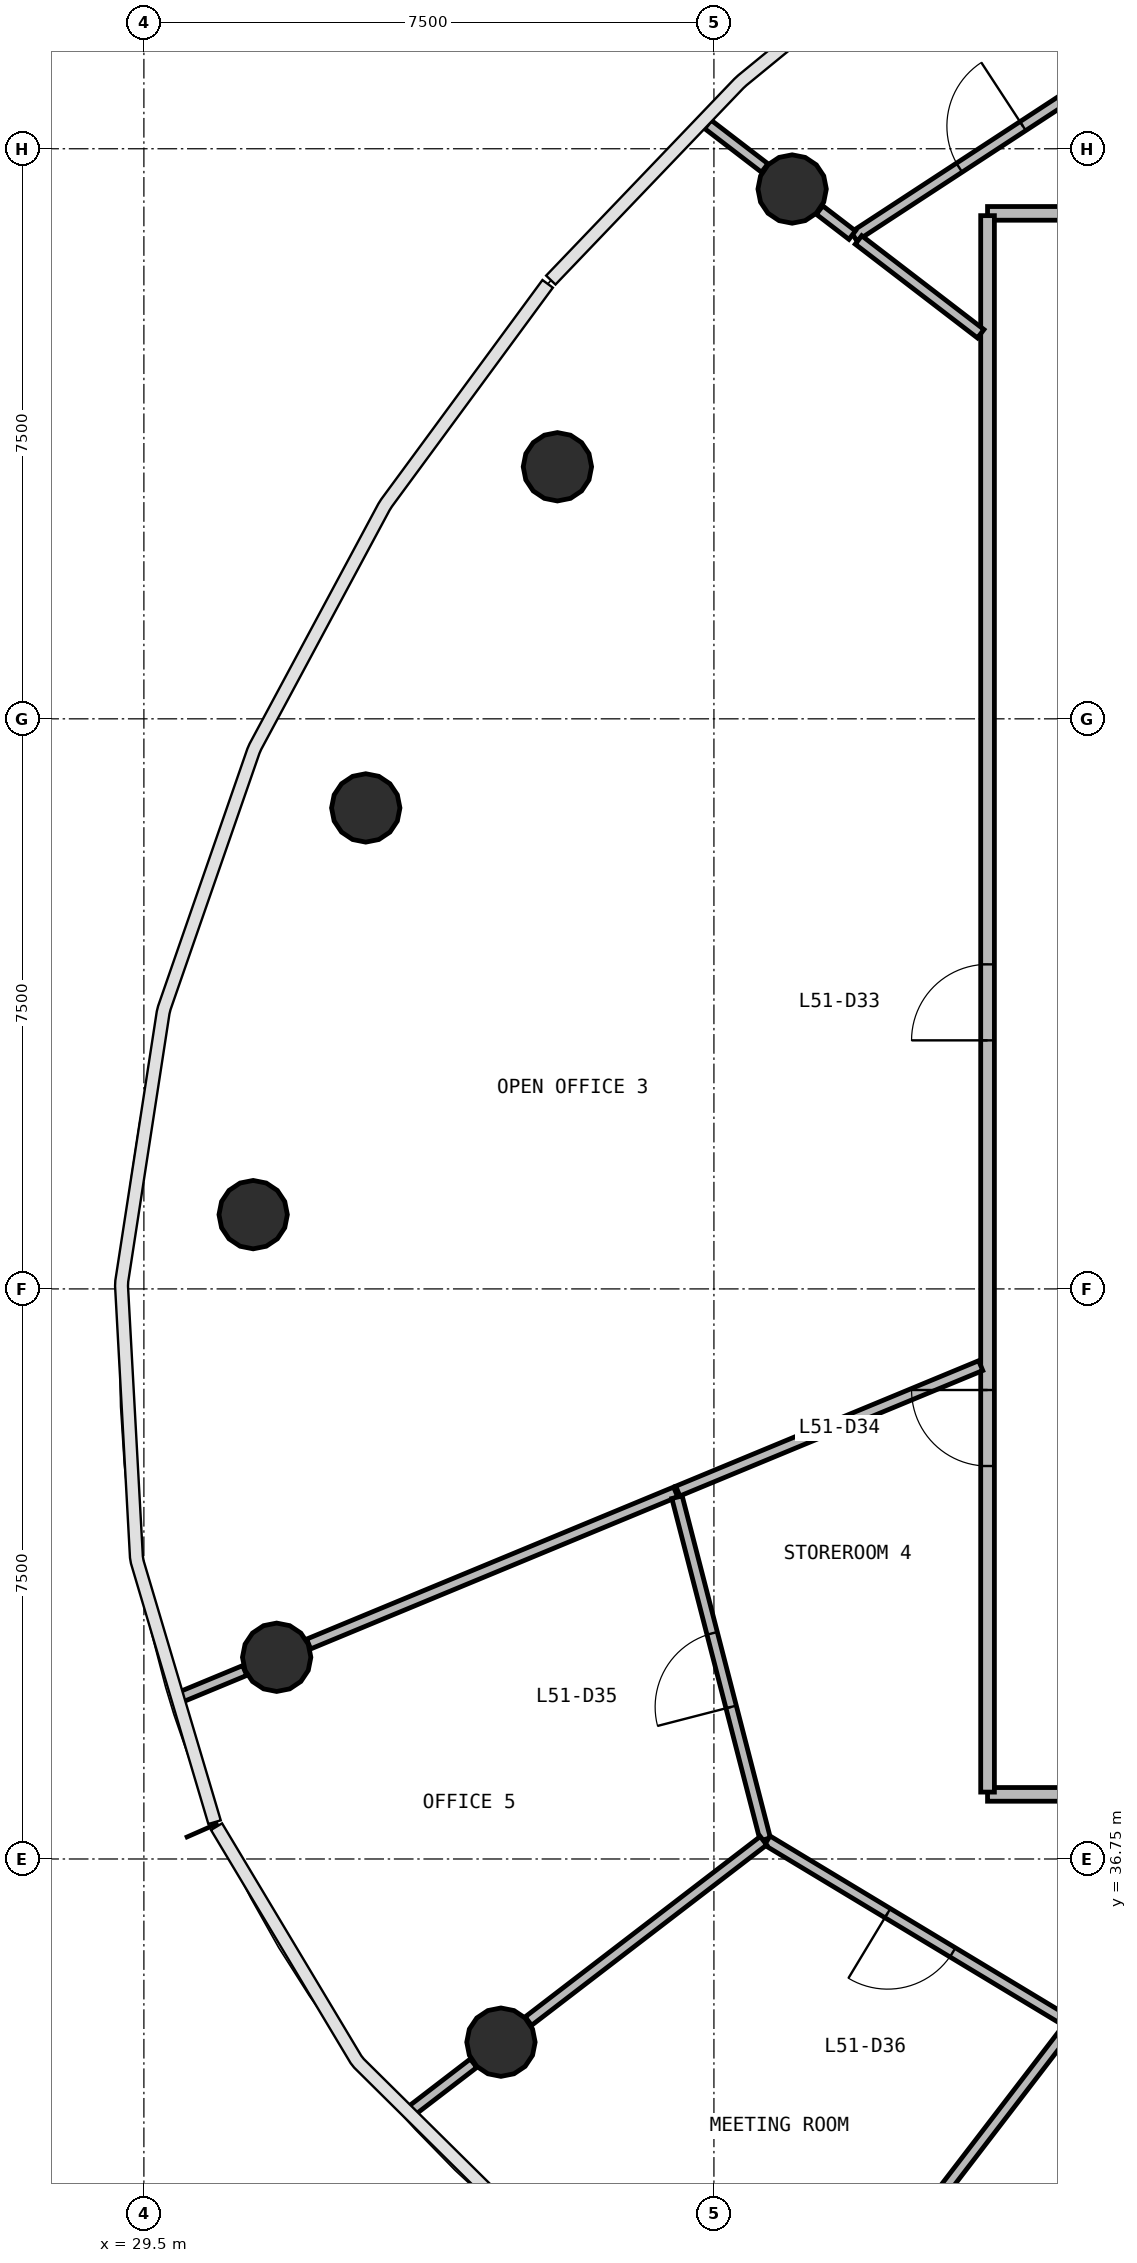
"""IFC4 building model, lengths in metres.
Left out: names, types, materials, properties, quantities, classifications, styles, units other than length and angle.
Written with IfcOpenShell. Run it as: python <this file> out.ifc"""

import sys

from ifc_helpers import new_model, si_unit, direction, frame, frame_2d, origin, origin_2d, place, context, subcontext, project, spatial, rectangle, circle, extrude, source, transform, mapped, element, fill, save


model = new_model("IFC4")
c1 = context("Model", 3, precision=1e-05, world=origin(), true_north=direction((0.0, 1.0)))
c2 = subcontext(c1, "Body", "Model", "MODEL_VIEW")
j1 = project(units=[si_unit("LENGTHUNIT", "METRE"), si_unit("PLANEANGLEUNIT", "RADIAN")], contexts=[c1])
p1 = place(None, origin())
s1 = spatial("IfcSite", under=j1, at=p1, CompositionType="ELEMENT")
p2 = place(p1, origin())
s2 = spatial("IfcBuilding", under=s1, at=p2, CompositionType="ELEMENT")
p3 = place(p2, frame((0.0, 0.0, 211.1)))
s3 = spatial("IfcBuildingStorey", under=s2, at=p3, CompositionType="ELEMENT", Elevation=211.1)
m1 = source(origin(), c2, "Body", "SweptSolid", [
    extrude(circle(Radius=0.45, at=origin_2d()), origin(), (0.0, 0.0, 1.0), 3.9),
])
for number, where, z_axis, x_axis in (
    (1, (38.029, 58.72, 0.0), (0.0, 0.0, 1.0), (1.0, 0.0, 0.0)),
    (2, (34.941, 55.066, 0.0), (0.0, 0.0, 1.0), (1.0, 0.0, 0.0)),
    (3, (32.419, 50.578, 0.0), (0.0, 0.0, 1.0), (1.0, 0.0, 0.0)),
    (4, (30.938, 45.227, 0.0), (0.0, 0.0, 1.0), (1.0, 0.0, 0.0)),
    (5, (31.247, 39.404, 0.0), (0.0, 0.0, 1.0), (1.0, 0.0, 0.0)),
    (6, (34.198, 34.34, 0.0), (0.0, 0.0, 1.0), (1.0, 0.0, 0.0)),
):
    element("IfcColumn", number, at=place(p3, frame(where, z_axis=z_axis, x_axis=x_axis)), inside=s3, PredefinedType="COLUMN", context=c2, shape_type="MappedRepresentation", body=[
        mapped(m1, transform((0.0, 0.0, 0.0), scale=1.0)),
    ])
p4 = place(p3, frame((40.6, 58.4, 0.0), z_axis=(0.0, 0.0, 1.0), x_axis=(1.0, 0.0, 0.0)))
e7 = element("IfcWall", 7, at=p4, inside=s3, PredefinedType="PARTITIONING", context=c2, shape_type="SweptSolid", body=[
    extrude(rectangle(XDim=22.8, YDim=0.18, at=frame_2d((11.4, 0.0))), origin(), (0.0, 0.0, 1.0), 2.88),
])
p5 = place(p4, frame((12.95, 0.0, 0.0)))
e8 = element("IfcOpeningElement", 8, at=p5, cuts=e7, PredefinedType="OPENING", context=c2, shape_type="SweptSolid", body=[
    extrude(rectangle(XDim=1.0, YDim=2.1, at=frame_2d((0.5, 1.05))), frame((0.0, 0.1, 0.0), z_axis=(0.0, -1.0, 0.0), x_axis=(1.0, 0.0, 0.0)), (0.0, 0.0, 1.0), 0.2),
])
p6 = place(p4, frame((10.95, 0.0, 0.0)))
e9 = element("IfcOpeningElement", 9, at=p6, cuts=e7, PredefinedType="OPENING", context=c2, shape_type="SweptSolid", body=[
    extrude(rectangle(XDim=1.0, YDim=2.1, at=frame_2d((0.5, 1.05))), frame((0.0, 0.1, 0.0), z_axis=(0.0, -1.0, 0.0), x_axis=(1.0, 0.0, 0.0)), (0.0, 0.0, 1.0), 0.2),
])
p7 = place(p3, frame((63.4, 37.6, 0.0), z_axis=(0.0, 0.0, 1.0), x_axis=(-1.0, 0.0, 0.0)))
e10 = element("IfcWall", 10, at=p7, inside=s3, PredefinedType="PARTITIONING", context=c2, shape_type="SweptSolid", body=[
    extrude(rectangle(XDim=22.8, YDim=0.18, at=frame_2d((11.4, 0.0))), origin(), (0.0, 0.0, 1.0), 2.88),
])
p8 = place(p7, frame((12.95, 0.0, 0.0)))
e11 = element("IfcOpeningElement", 11, at=p8, cuts=e10, PredefinedType="OPENING", context=c2, shape_type="SweptSolid", body=[
    extrude(rectangle(XDim=1.0, YDim=2.1, at=frame_2d((0.5, 1.05))), frame((0.0, 0.1, 0.0), z_axis=(0.0, -1.0, 0.0), x_axis=(1.0, 0.0, 0.0)), (0.0, 0.0, 1.0), 0.2),
])
p9 = place(p7, frame((10.95, 0.0, 0.0)))
e12 = element("IfcOpeningElement", 12, at=p9, cuts=e10, PredefinedType="OPENING", context=c2, shape_type="SweptSolid", body=[
    extrude(rectangle(XDim=1.0, YDim=2.1, at=frame_2d((0.5, 1.05))), frame((0.0, 0.1, 0.0), z_axis=(0.0, -1.0, 0.0), x_axis=(1.0, 0.0, 0.0)), (0.0, 0.0, 1.0), 0.2),
])
p10 = place(p7, frame((5.75, 0.0, 0.0)))
e13 = element("IfcOpeningElement", 13, at=p10, cuts=e10, PredefinedType="OPENING", context=c2, shape_type="SweptSolid", body=[
    extrude(rectangle(XDim=1.0, YDim=2.1, at=frame_2d((0.5, 1.05))), frame((0.0, 0.1, 0.0), z_axis=(0.0, -1.0, 0.0), x_axis=(1.0, 0.0, 0.0)), (0.0, 0.0, 1.0), 0.2),
])
p11 = place(p3, frame((40.6, 37.63, 0.0), z_axis=(0.0, 0.0, 1.0), x_axis=(0.0, 1.0, 0.0)))
e14 = element("IfcWall", 14, at=p11, inside=s3, PredefinedType="PARTITIONING", context=c2, shape_type="SweptSolid", body=[
    extrude(rectangle(XDim=20.74, YDim=0.18, at=frame_2d((10.37, 0.0))), origin(), (0.0, 0.0, 1.0), 2.88),
])
p12 = place(p11, frame((9.89, 0.0, 0.0)))
e15 = element("IfcOpeningElement", 15, at=p12, cuts=e14, PredefinedType="OPENING", context=c2, shape_type="SweptSolid", body=[
    extrude(rectangle(XDim=1.0, YDim=2.1, at=frame_2d((0.5, 1.05))), frame((0.0, 0.1, 0.0), z_axis=(0.0, -1.0, 0.0), x_axis=(1.0, 0.0, 0.0)), (0.0, 0.0, 1.0), 0.2),
])
p13 = place(p11, frame((4.29, 0.0, 0.0)))
e16 = element("IfcOpeningElement", 16, at=p13, cuts=e14, PredefinedType="OPENING", context=c2, shape_type="SweptSolid", body=[
    extrude(rectangle(XDim=1.0, YDim=2.1, at=frame_2d((0.5, 1.05))), frame((0.0, 0.1, 0.0), z_axis=(0.0, -1.0, 0.0), x_axis=(1.0, 0.0, 0.0)), (0.0, 0.0, 1.0), 0.2),
])
p14 = place(p3, frame((36.497, 41.578, 0.0), z_axis=(0.0, 0.0, 1.0), x_axis=(-0.923872241602, -0.382701033703, 0.0)))
e17 = element("IfcWall", 17, at=p14, inside=s3, PredefinedType="PARTITIONING", context=c2, shape_type="SweptSolid", body=[
    extrude(rectangle(XDim=5.227, YDim=0.14, at=frame_2d((2.614, 0.0))), origin(), (0.0, 0.0, 1.0), 2.88),
])
p15 = place(p3, frame((37.676, 37.009, 0.0), z_axis=(0.0, 0.0, 1.0), x_axis=(-0.249819251726, 0.968292487561, 0.0)))
e18 = element("IfcWall", 18, at=p15, inside=s3, PredefinedType="PARTITIONING", context=c2, shape_type="SweptSolid", body=[
    extrude(rectangle(XDim=4.649, YDim=0.14, at=frame_2d((2.324, 0.0))), origin(), (0.0, 0.0, 1.0), 2.88),
])
p16 = place(p15, frame((1.799, 0.0, 0.0)))
e19 = element("IfcOpeningElement", 19, at=p16, cuts=e18, PredefinedType="OPENING", context=c2, shape_type="SweptSolid", body=[
    extrude(rectangle(XDim=1.0, YDim=2.1, at=frame_2d((0.5, 1.05))), frame((0.0, 0.08, 0.0), z_axis=(0.0, -1.0, 0.0), x_axis=(1.0, 0.0, 0.0)), (0.0, 0.0, 1.0), 0.16),
])
p17 = place(p3, frame((41.702, 34.58, 0.0), z_axis=(0.0, 0.0, 1.0), x_axis=(-0.856310382511, 0.516461546298, 0.0)))
e20 = element("IfcWall", 20, at=p17, inside=s3, PredefinedType="PARTITIONING", context=c2, shape_type="SweptSolid", body=[
    extrude(rectangle(XDim=4.672, YDim=0.14, at=frame_2d((2.336, 0.0))), origin(), (0.0, 0.0, 1.0), 2.88),
])
p18 = place(p17, frame((1.823, 0.0, 0.0)))
e21 = element("IfcOpeningElement", 21, at=p18, cuts=e20, PredefinedType="OPENING", context=c2, shape_type="SweptSolid", body=[
    extrude(rectangle(XDim=1.0, YDim=2.1, at=frame_2d((0.5, 1.05))), frame((0.0, 0.08, 0.0), z_axis=(0.0, -1.0, 0.0), x_axis=(1.0, 0.0, 0.0)), (0.0, 0.0, 1.0), 0.16),
])
p19 = place(p3, frame((40.51, 43.241, 0.0), z_axis=(0.0, 0.0, 1.0), x_axis=(-0.923880260939, -0.382681673781, 0.0)))
e22 = element("IfcWall", 22, at=p19, inside=s3, PredefinedType="PARTITIONING", context=c2, shape_type="SweptSolid", body=[
    extrude(rectangle(XDim=4.314, YDim=0.14, at=frame_2d((2.157, 0.0))), origin(), (0.0, 0.0, 1.0), 2.88),
])
p20 = place(p3, frame((38.843, 58.096, 0.0), z_axis=(0.0, 0.0, 1.0), x_axis=(0.83707650684, 0.547085844907, 0.0)))
e23 = element("IfcWall", 23, at=p20, inside=s3, PredefinedType="PARTITIONING", context=c2, shape_type="SweptSolid", body=[
    extrude(rectangle(XDim=4.305, YDim=0.14, at=frame_2d((2.152, 0.0))), origin(), (0.0, 0.0, 1.0), 2.88),
])
p21 = place(p20, frame((1.655, 0.0, 0.0)))
e24 = element("IfcOpeningElement", 24, at=p21, cuts=e23, PredefinedType="OPENING", context=c2, shape_type="SweptSolid", body=[
    extrude(rectangle(XDim=1.0, YDim=2.1, at=frame_2d((0.5, 1.05))), frame((0.0, 0.08, 0.0), z_axis=(0.0, -1.0, 0.0), x_axis=(1.0, 0.0, 0.0)), (0.0, 0.0, 1.0), 0.16),
])
p22 = place(p3, frame((37.652, 36.99, 0.0), z_axis=(0.0, 0.0, 1.0), x_axis=(-0.793347300472, -0.608769300173, 0.0)))
e25 = element("IfcWall", 25, at=p22, inside=s3, PredefinedType="PARTITIONING", context=c2, shape_type="SweptSolid", body=[
    extrude(rectangle(XDim=3.899, YDim=0.14, at=frame_2d((1.95, 0.0))), origin(), (0.0, 0.0, 1.0), 2.88),
])
p23 = place(p3, frame((41.66, 34.524, 0.0), z_axis=(0.0, 0.0, 1.0), x_axis=(-0.60877322383, -0.793344289667, 0.0)))
e26 = element("IfcWall", 26, at=p23, inside=s3, PredefinedType="PARTITIONING", context=c2, shape_type="SweptSolid", body=[
    extrude(rectangle(XDim=3.765, YDim=0.14, at=frame_2d((1.882, 0.0))), origin(), (0.0, 0.0, 1.0), 2.88),
])
p24 = place(p3, frame((38.39, 58.444, 0.0), z_axis=(0.0, 0.0, 1.0), x_axis=(0.793294129055, -0.608838586825, 0.0)))
e27 = element("IfcWall", 27, at=p24, inside=s3, PredefinedType="PARTITIONING", context=c2, shape_type="SweptSolid", body=[
    extrude(rectangle(XDim=0.541, YDim=0.14, at=frame_2d((0.271, 0.0))), origin(), (0.0, 0.0, 1.0), 2.88),
])
p25 = place(p3, frame((38.902, 58.051, 0.0), z_axis=(0.0, 0.0, 1.0), x_axis=(0.7933756116, -0.608732403374, 0.0)))
e28 = element("IfcWall", 28, at=p25, inside=s3, PredefinedType="PARTITIONING", context=c2, shape_type="SweptSolid", body=[
    extrude(rectangle(XDim=2.027, YDim=0.14, at=frame_2d((1.013, 0.0))), origin(), (0.0, 0.0, 1.0), 2.88),
])
p26 = place(p3, frame((33.837, 34.063, 0.0), z_axis=(0.0, 0.0, 1.0), x_axis=(-0.793403619358, -0.608695898449, 0.0)))
e29 = element("IfcWall", 29, at=p26, inside=s3, PredefinedType="PARTITIONING", context=c2, shape_type="SweptSolid", body=[
    extrude(rectangle(XDim=1.047, YDim=0.14, at=frame_2d((0.523, 0.0))), origin(), (0.0, 0.0, 1.0), 2.88),
])
p27 = place(p3, frame((30.826, 39.23, 0.0), z_axis=(0.0, 0.0, 1.0), x_axis=(-0.923779659408, -0.38292445843, 0.0)))
e30 = element("IfcWall", 30, at=p27, inside=s3, PredefinedType="PARTITIONING", context=c2, shape_type="SweptSolid", body=[
    extrude(rectangle(XDim=0.954, YDim=0.14, at=frame_2d((0.477, 0.0))), origin(), (0.0, 0.0, 1.0), 2.88),
])
p28 = place(p3, frame((37.668, 58.997, 0.0), z_axis=(0.0, 0.0, 1.0), x_axis=(-0.793344167197, 0.608773383431, 0.0)))
e31 = element("IfcWall", 31, at=p28, inside=s3, PredefinedType="PARTITIONING", context=c2, shape_type="SweptSolid", body=[
    extrude(rectangle(XDim=0.944, YDim=0.14, at=frame_2d((0.472, 0.0))), origin(), (0.0, 0.0, 1.0), 2.88),
])
m2 = source(origin(), c2, "Body", "SweptSolid", [
    extrude(rectangle(XDim=1.0, YDim=2.1, at=frame_2d((0.5, 1.05))), frame((0.0, 0.025, 0.0), z_axis=(0.0, -1.0, 0.0), x_axis=(1.0, 0.0, 0.0)), (0.0, 0.0, 1.0), 0.05),
])
p29 = place(p21, origin())
e32 = element("IfcDoor", 32, at=p29, inside=s3, OperationType="SINGLE_SWING_RIGHT", PredefinedType="DOOR", context=c2, shape_type="MappedRepresentation", body=[
    mapped(m2, transform((0.0, 0.0, 0.0), scale=1.0)),
])
fill(e24, e32)
p30 = place(p12, origin())
e33 = element("IfcDoor", 33, at=p30, inside=s3, OperationType="SINGLE_SWING_LEFT", PredefinedType="DOOR", context=c2, shape_type="MappedRepresentation", body=[
    mapped(m2, transform((0.0, 0.0, 0.0), scale=1.0)),
])
fill(e15, e33)
p31 = place(p13, origin())
e34 = element("IfcDoor", 34, at=p31, inside=s3, OperationType="SINGLE_SWING_RIGHT", PredefinedType="DOOR", context=c2, shape_type="MappedRepresentation", body=[
    mapped(m2, transform((0.0, 0.0, 0.0), scale=1.0)),
])
fill(e16, e34)
p32 = place(p16, origin())
e35 = element("IfcDoor", 35, at=p32, inside=s3, OperationType="SINGLE_SWING_LEFT", PredefinedType="DOOR", context=c2, shape_type="MappedRepresentation", body=[
    mapped(m2, transform((0.0, 0.0, 0.0), scale=1.0)),
])
fill(e19, e35)
p33 = place(p18, origin())
e36 = element("IfcDoor", 36, at=p33, inside=s3, OperationType="SINGLE_SWING_RIGHT", PredefinedType="DOOR", context=c2, shape_type="MappedRepresentation", body=[
    mapped(m2, transform((0.0, 0.0, 0.0), scale=1.0)),
])
fill(e21, e36)
save(model, sys.argv[1])
